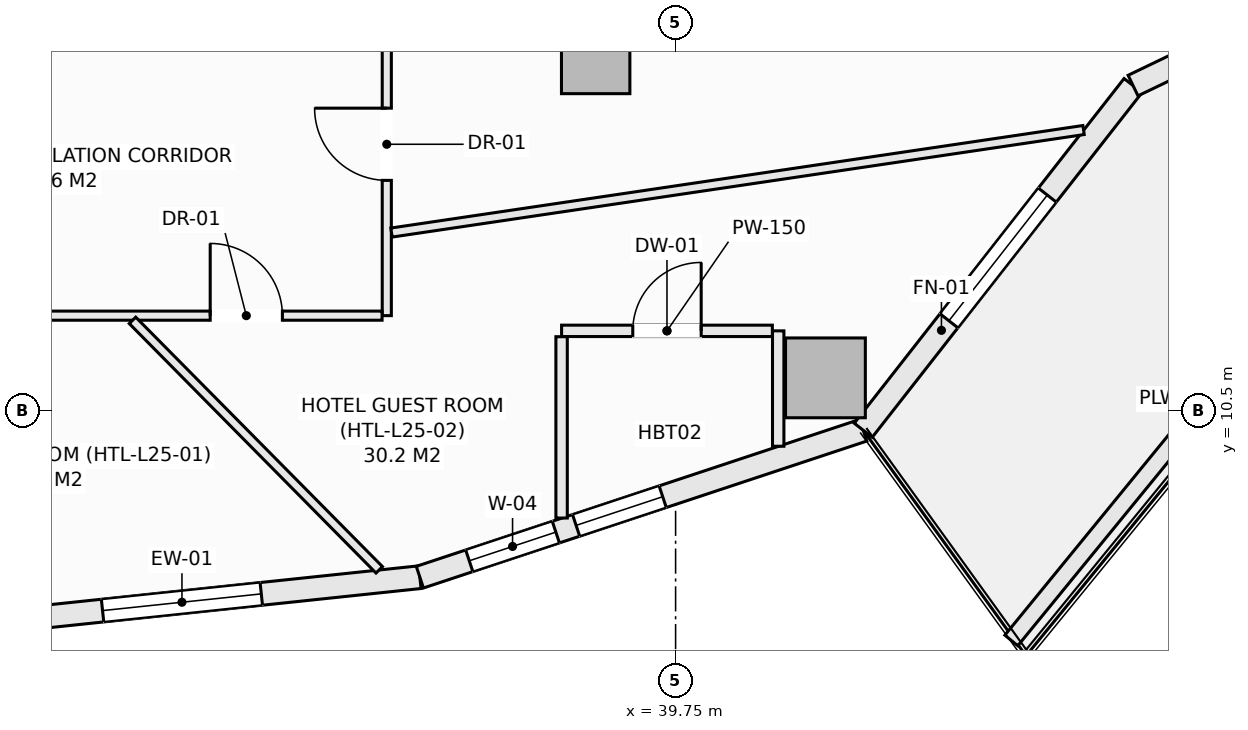
"""IFC4 building model, lengths in metres.
Left out: names, types, materials, properties, quantities, classifications, styles, units other than length and angle.
Written with IfcOpenShell. Run it as: python <this file> out.ifc"""

import sys

from ifc_helpers import new_model, si_unit, direction, frame, frame_2d, origin, origin_2d, place, context, subcontext, project, spatial, rectangle, extrude, element, fill, save


model = new_model("IFC4")
c1 = context("Model", 3, precision=1e-05, world=origin(), true_north=direction((0.0, 1.0)))
c2 = subcontext(c1, "Body", "Model", "MODEL_VIEW")
j1 = project(units=[si_unit("LENGTHUNIT", "METRE"), si_unit("PLANEANGLEUNIT", "RADIAN")], contexts=[c1])
p1 = place(None, origin())
s1 = spatial("IfcSite", under=j1, at=p1, CompositionType="ELEMENT")
p2 = place(p1, origin())
s2 = spatial("IfcBuilding", under=s1, at=p2, CompositionType="ELEMENT")
p3 = place(p2, frame((0.0, 0.0, 105.3)))
s3 = spatial("IfcBuildingStorey", under=s2, at=p3, CompositionType="ELEMENT", Elevation=105.3)
p4 = place(p3, frame((41.721, 10.932, -0.27), z_axis=(0.0, 0.0, 1.0), x_axis=(1.0, 0.0, 0.0)))
e1 = element("IfcColumn", 1, at=p4, inside=s3, PredefinedType="COLUMN", context=c2, shape_type="SweptSolid", body=[
    extrude(rectangle(XDim=1.05, YDim=1.05, at=origin_2d()), origin(), (0.0, 0.0, 1.0), 3.4),
])
p5 = place(p3, frame((38.698, 15.121, -0.27), z_axis=(0.0, 0.0, 1.0), x_axis=(1.0, 0.0, 0.0)))
e2 = element("IfcColumn", 2, at=p5, inside=s3, PredefinedType="COLUMN", context=c2, shape_type="SweptSolid", body=[
    extrude(rectangle(XDim=0.9, YDim=0.9, at=origin_2d()), origin(), (0.0, 0.0, 1.0), 3.4),
])
p6 = place(p3, frame((30.125, 7.65, 0.0), z_axis=(0.0, 0.0, 1.0), x_axis=(0.994498012394, 0.104755445421, 0.0)))
e3 = element("IfcWall", 3, at=p6, inside=s3, PredefinedType="SOLIDWALL", context=c2, shape_type="SweptSolid", body=[
    extrude(rectangle(XDim=6.295, YDim=0.3, at=frame_2d((3.147, 0.0))), origin(), (0.0, 0.0, 1.0), 2.653),
])
p7 = place(p6, frame((2.097, 0.0, 0.74)))
e4 = element("IfcOpeningElement", 4, at=p7, cuts=e3, PredefinedType="OPENING", context=c2, shape_type="SweptSolid", body=[
    extrude(rectangle(XDim=2.1, YDim=1.7, at=frame_2d((1.05, 0.85))), frame((0.0, 0.16, 0.0), z_axis=(0.0, -1.0, 0.0), x_axis=(1.0, 0.0, 0.0)), (0.0, 0.0, 1.0), 0.32),
])
p8 = place(p3, frame((36.385, 8.309, 0.0), z_axis=(0.0, 0.0, 1.0), x_axis=(0.949238009374, 0.314558741032, 0.0)))
e5 = element("IfcWall", 5, at=p8, inside=s3, PredefinedType="SOLIDWALL", context=c2, shape_type="SweptSolid", body=[
    extrude(rectangle(XDim=6.146, YDim=0.3, at=frame_2d((3.073, 0.0))), origin(), (0.0, 0.0, 1.0), 2.653),
])
p9 = place(p8, frame((0.685, 0.0, 0.74)))
e6 = element("IfcOpeningElement", 6, at=p9, cuts=e5, PredefinedType="OPENING", context=c2, shape_type="SweptSolid", body=[
    extrude(rectangle(XDim=1.2, YDim=1.7, at=frame_2d((0.6, 0.85))), frame((0.0, 0.16, 0.0), z_axis=(0.0, -1.0, 0.0), x_axis=(1.0, 0.0, 0.0)), (0.0, 0.0, 1.0), 0.32),
])
p10 = place(p8, frame((2.166, 0.0, 0.74)))
e7 = element("IfcOpeningElement", 7, at=p10, cuts=e5, PredefinedType="OPENING", context=c2, shape_type="SweptSolid", body=[
    extrude(rectangle(XDim=1.2, YDim=1.7, at=frame_2d((0.6, 0.85))), frame((0.0, 0.16, 0.0), z_axis=(0.0, -1.0, 0.0), x_axis=(1.0, 0.0, 0.0)), (0.0, 0.0, 1.0), 0.32),
])
p11 = place(p3, frame((42.219, 10.242, 0.0), z_axis=(0.0, 0.0, 1.0), x_axis=(0.616435134162, 0.787405693001, 0.0)))
e8 = element("IfcWall", 8, at=p11, inside=s3, PredefinedType="SOLIDWALL", context=c2, shape_type="SweptSolid", body=[
    extrude(rectangle(XDim=5.759, YDim=0.3, at=frame_2d((2.879, 0.0))), origin(), (0.0, 0.0, 1.0), 2.653),
])
p12 = place(p11, frame((1.829, 0.0, 0.74)))
e9 = element("IfcOpeningElement", 9, at=p12, cuts=e8, PredefinedType="OPENING", context=c2, shape_type="SweptSolid", body=[
    extrude(rectangle(XDim=2.1, YDim=1.7, at=frame_2d((1.05, 0.85))), frame((0.0, 0.16, 0.0), z_axis=(0.0, -1.0, 0.0), x_axis=(1.0, 0.0, 0.0)), (0.0, 0.0, 1.0), 0.32),
])
p13 = place(p3, frame((45.769, 14.777, 0.0), z_axis=(0.0, 0.0, 1.0), x_axis=(0.901370184739, 0.433049408339, 0.0)))
e10 = element("IfcWall", 10, at=p13, inside=s3, PredefinedType="SOLIDWALL", context=c2, shape_type="SweptSolid", body=[
    extrude(rectangle(XDim=5.884, YDim=0.3, at=frame_2d((2.942, 0.0))), origin(), (0.0, 0.0, 1.0), 2.653),
])
p14 = place(p13, frame((2.042, 0.0, 0.0)))
e11 = element("IfcOpeningElement", 11, at=p14, cuts=e10, PredefinedType="OPENING", context=c2, shape_type="SweptSolid", body=[
    extrude(rectangle(XDim=1.8, YDim=2.25, at=frame_2d((0.9, 1.125))), frame((0.0, 0.16, 0.0), z_axis=(0.0, -1.0, 0.0), x_axis=(1.0, 0.0, 0.0)), (0.0, 0.0, 1.0), 0.32),
])
p15 = place(p3, frame((44.167, 7.477, 0.0), z_axis=(0.0, 0.0, 1.0), x_axis=(0.633002467947, 0.77414977593, 0.0)))
e12 = element("IfcWall", 12, at=p15, inside=s3, PredefinedType="PARAPET", context=c2, shape_type="SweptSolid", body=[
    extrude(rectangle(XDim=6.78, YDim=0.22, at=frame_2d((3.39, 0.0))), origin(), (0.0, 0.0, 1.0), 0.52),
])
p16 = place(p3, frame((35.95, 11.75, 0.0), z_axis=(0.0, 0.0, 1.0), x_axis=(0.0, 1.0, 0.0)))
e13 = element("IfcWall", 13, at=p16, inside=s3, PredefinedType="PARTITIONING", context=c2, shape_type="SweptSolid", body=[
    extrude(rectangle(XDim=3.838, YDim=0.12, at=frame_2d((1.919, 0.0))), origin(), (0.0, 0.0, 1.0), 3.13),
])
p17 = place(p16, frame((1.78, 0.0, 0.0)))
e14 = element("IfcOpeningElement", 14, at=p17, cuts=e13, PredefinedType="OPENING", context=c2, shape_type="SweptSolid", body=[
    extrude(rectangle(XDim=0.95, YDim=2.1, at=frame_2d((0.475, 1.05))), frame((0.0, 0.07, 0.0), z_axis=(0.0, -1.0, 0.0), x_axis=(1.0, 0.0, 0.0)), (0.0, 0.0, 1.0), 0.14),
])
p18 = place(p3, frame((27.212, 11.75, 0.0), z_axis=(0.0, 0.0, 1.0), x_axis=(1.0, 0.0, 0.0)))
e15 = element("IfcWall", 15, at=p18, inside=s3, PredefinedType="PARTITIONING", context=c2, shape_type="SweptSolid", body=[
    extrude(rectangle(XDim=8.676, YDim=0.12, at=frame_2d((4.338, 0.0))), origin(), (0.0, 0.0, 1.0), 3.13),
])
p19 = place(p18, frame((2.444, 0.0, 0.0)))
e16 = element("IfcOpeningElement", 16, at=p19, cuts=e15, PredefinedType="OPENING", context=c2, shape_type="SweptSolid", body=[
    extrude(rectangle(XDim=0.95, YDim=2.1, at=frame_2d((0.475, 1.05))), frame((0.0, 0.07, 0.0), z_axis=(0.0, -1.0, 0.0), x_axis=(1.0, 0.0, 0.0)), (0.0, 0.0, 1.0), 0.14),
])
p20 = place(p18, frame((6.415, 0.0, 0.0)))
e17 = element("IfcOpeningElement", 17, at=p20, cuts=e15, PredefinedType="OPENING", context=c2, shape_type="SweptSolid", body=[
    extrude(rectangle(XDim=0.95, YDim=2.1, at=frame_2d((0.475, 1.05))), frame((0.0, 0.07, 0.0), z_axis=(0.0, -1.0, 0.0), x_axis=(1.0, 0.0, 0.0)), (0.0, 0.0, 1.0), 0.14),
])
p21 = place(p3, frame((36.012, 12.843, 0.0), z_axis=(0.0, 0.0, 1.0), x_axis=(0.989205313502, 0.146536165297, 0.0)))
e18 = element("IfcWall", 18, at=p21, inside=s3, PredefinedType="PARTITIONING", context=c2, shape_type="SweptSolid", body=[
    extrude(rectangle(XDim=9.205, YDim=0.12, at=frame_2d((4.603, 0.0))), origin(), (0.0, 0.0, 1.0), 3.13),
])
p22 = place(p3, frame((32.604, 11.688, 0.0), z_axis=(0.0, 0.0, 1.0), x_axis=(0.703262237237, -0.710930535057, 0.0)))
e19 = element("IfcWall", 19, at=p22, inside=s3, PredefinedType="PARTITIONING", context=c2, shape_type="SweptSolid", body=[
    extrude(rectangle(XDim=4.616, YDim=0.12, at=frame_2d((2.308, 0.0))), origin(), (0.0, 0.0, 1.0), 3.13),
])
p23 = place(p3, frame((41.1, 10.032, 0.0), z_axis=(0.0, 0.0, 1.0), x_axis=(0.0, 1.0, 0.0)))
e20 = element("IfcWall", 20, at=p23, inside=s3, PredefinedType="PARTITIONING", context=c2, shape_type="SweptSolid", body=[
    extrude(rectangle(XDim=1.518, YDim=0.15, at=frame_2d((0.759, 0.0))), origin(), (0.0, 0.0, 1.0), 2.505),
])
p24 = place(p3, frame((38.25, 11.55, 0.0), z_axis=(0.0, 0.0, 1.0), x_axis=(1.0, 0.0, 0.0)))
e21 = element("IfcWall", 21, at=p24, inside=s3, PredefinedType="PARTITIONING", context=c2, shape_type="SweptSolid", body=[
    extrude(rectangle(XDim=2.773, YDim=0.15, at=frame_2d((1.386, 0.0))), origin(), (0.0, 0.0, 1.0), 3.13),
])
p25 = place(p24, frame((0.937, 0.0, 0.0)))
e22 = element("IfcOpeningElement", 22, at=p25, cuts=e21, PredefinedType="OPENING", context=c2, shape_type="SweptSolid", body=[
    extrude(rectangle(XDim=0.9, YDim=2.1, at=frame_2d((0.45, 1.05))), frame((0.0, 0.085, 0.0), z_axis=(0.0, -1.0, 0.0), x_axis=(1.0, 0.0, 0.0)), (0.0, 0.0, 1.0), 0.17),
])
p26 = place(p3, frame((38.25, 9.087, 0.0), z_axis=(0.0, 0.0, 1.0), x_axis=(0.0, 1.0, 0.0)))
e23 = element("IfcWall", 23, at=p26, inside=s3, PredefinedType="PARTITIONING", context=c2, shape_type="SweptSolid", body=[
    extrude(rectangle(XDim=2.385, YDim=0.15, at=frame_2d((1.193, 0.0))), origin(), (0.0, 0.0, 1.0), 3.13),
])
p27 = place(p7, origin())
e24 = element("IfcWindow", 24, at=p27, inside=s3, PartitioningType="SINGLE_PANEL", PredefinedType="WINDOW", context=c2, shape_type="SweptSolid", body=[
    extrude(rectangle(XDim=2.1, YDim=1.7, at=frame_2d((1.05, 0.85))), frame((0.0, 0.03, 0.0), z_axis=(0.0, -1.0, 0.0), x_axis=(1.0, 0.0, 0.0)), (0.0, 0.0, 1.0), 0.06),
])
fill(e4, e24)
p28 = place(p9, origin())
e25 = element("IfcWindow", 25, at=p28, inside=s3, PartitioningType="SINGLE_PANEL", PredefinedType="WINDOW", context=c2, shape_type="SweptSolid", body=[
    extrude(rectangle(XDim=1.2, YDim=1.7, at=frame_2d((0.6, 0.85))), frame((0.0, 0.03, 0.0), z_axis=(0.0, -1.0, 0.0), x_axis=(1.0, 0.0, 0.0)), (0.0, 0.0, 1.0), 0.06),
])
fill(e6, e25)
p29 = place(p12, origin())
e26 = element("IfcWindow", 26, at=p29, inside=s3, PartitioningType="SINGLE_PANEL", PredefinedType="WINDOW", context=c2, shape_type="SweptSolid", body=[
    extrude(rectangle(XDim=2.1, YDim=1.7, at=frame_2d((1.05, 0.85))), frame((0.0, 0.03, 0.0), z_axis=(0.0, -1.0, 0.0), x_axis=(1.0, 0.0, 0.0)), (0.0, 0.0, 1.0), 0.06),
])
fill(e9, e26)
p30 = place(p20, origin())
e27 = element("IfcDoor", 27, at=p30, inside=s3, OperationType="SINGLE_SWING_LEFT", PredefinedType="DOOR", context=c2, shape_type="SweptSolid", body=[
    extrude(rectangle(XDim=0.95, YDim=2.1, at=frame_2d((0.475, 1.05))), frame((0.0, 0.025, 0.0), z_axis=(0.0, -1.0, 0.0), x_axis=(1.0, 0.0, 0.0)), (0.0, 0.0, 1.0), 0.05),
])
fill(e17, e27)
p31 = place(p17, origin())
e28 = element("IfcDoor", 28, at=p31, inside=s3, OperationType="SINGLE_SWING_RIGHT", PredefinedType="DOOR", context=c2, shape_type="SweptSolid", body=[
    extrude(rectangle(XDim=0.95, YDim=2.1, at=frame_2d((0.475, 1.05))), frame((0.0, 0.025, 0.0), z_axis=(0.0, -1.0, 0.0), x_axis=(1.0, 0.0, 0.0)), (0.0, 0.0, 1.0), 0.05),
])
fill(e14, e28)
p32 = place(p25, origin())
e29 = element("IfcDoor", 29, at=p32, inside=s3, OperationType="SINGLE_SWING_RIGHT", PredefinedType="DOOR", context=c2, shape_type="SweptSolid", body=[
    extrude(rectangle(XDim=0.9, YDim=2.1, at=frame_2d((0.45, 1.05))), frame((0.0, 0.025, 0.0), z_axis=(0.0, -1.0, 0.0), x_axis=(1.0, 0.0, 0.0)), (0.0, 0.0, 1.0), 0.05),
])
fill(e22, e29)
p33 = place(p10, origin())
e30 = element("IfcWindow", 30, at=p33, inside=s3, PartitioningType="SINGLE_PANEL", PredefinedType="WINDOW", context=c2, shape_type="SweptSolid", body=[
    extrude(rectangle(XDim=1.2, YDim=1.7, at=frame_2d((0.6, 0.85))), frame((0.0, 0.03, 0.0), z_axis=(0.0, -1.0, 0.0), x_axis=(1.0, 0.0, 0.0)), (0.0, 0.0, 1.0), 0.06),
])
fill(e7, e30)
save(model, sys.argv[1])
